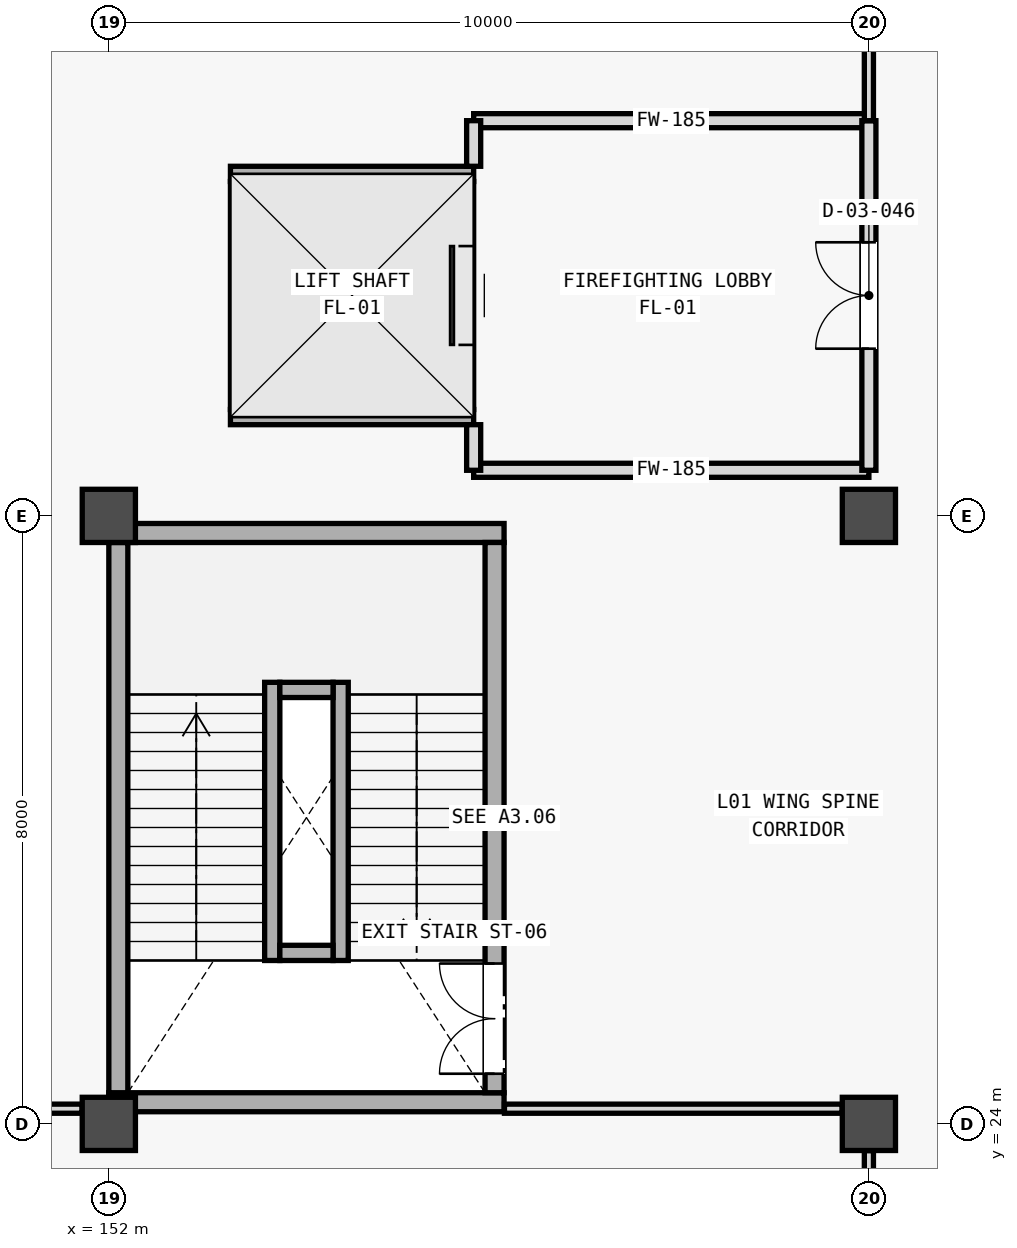
"""IFC4 building model, lengths in metres.
Left out: names, types, materials, properties, quantities, classifications, styles, units other than length and angle.
Written with IfcOpenShell. Run it as: python <this file> out.ifc"""

import sys

from ifc_helpers import new_model, si_unit, direction, frame, frame_2d, origin, origin_2d, place, context, subcontext, project, spatial, rectangle, extrude, element, fill, save


model = new_model("IFC4")
c1 = context("Model", 3, precision=1e-05, world=origin(), true_north=direction((0.0, 1.0)))
c2 = subcontext(c1, "Body", "Model", "MODEL_VIEW")
j1 = project(units=[si_unit("LENGTHUNIT", "METRE"), si_unit("PLANEANGLEUNIT", "RADIAN")], contexts=[c1])
p1 = place(None, origin())
s1 = spatial("IfcSite", under=j1, at=p1, CompositionType="ELEMENT")
p2 = place(p1, origin())
s2 = spatial("IfcBuilding", under=s1, at=p2, CompositionType="ELEMENT")
p3 = place(p2, frame((0.0, 0.0, 5.4)))
s3 = spatial("IfcBuildingStorey", under=s2, at=p3, CompositionType="ELEMENT", Elevation=5.4)
for number, where, z_axis, x_axis in (
    (1, (152.0, 24.0, 0.0), (0.0, 0.0, 1.0), (1.0, 0.0, 0.0)),
    (2, (162.0, 24.0, 0.0), (0.0, 0.0, 1.0), (1.0, 0.0, 0.0)),
    (3, (152.0, 32.0, 0.0), (0.0, 0.0, 1.0), (1.0, 0.0, 0.0)),
    (4, (162.0, 32.0, 0.0), (0.0, 0.0, 1.0), (1.0, 0.0, 0.0)),
):
    element("IfcColumn", number, at=place(p3, frame(where, z_axis=z_axis, x_axis=x_axis)), inside=s3, PredefinedType="COLUMN", context=c2, shape_type="SweptSolid", body=[
        extrude(rectangle(XDim=0.7, YDim=0.7, at=origin_2d()), origin(), (0.0, 0.0, 1.0), 4.55),
    ])
for number, where, z_axis, x_axis in (
    (5, (152.0, 24.285, 0.0), (0.0, 0.0, 1.0), (1.0, 0.0, 0.0)),
    (6, (152.0, 31.775, 0.0), (0.0, 0.0, 1.0), (1.0, 0.0, 0.0)),
):
    element("IfcWall", number, at=place(p3, frame(where, z_axis=z_axis, x_axis=x_axis)), inside=s3, PredefinedType="SHEAR", context=c2, shape_type="SweptSolid", body=[
        extrude(rectangle(XDim=5.2, YDim=0.25, at=frame_2d((2.6, 0.0))), origin(), (0.0, 0.0, 1.0), 4.8),
    ])
p4 = place(p3, frame((152.125, 24.41, 0.0), z_axis=(0.0, 0.0, 1.0), x_axis=(0.0, 1.0, 0.0)))
e7 = element("IfcWall", 7, at=p4, inside=s3, PredefinedType="SHEAR", context=c2, shape_type="SweptSolid", body=[
    extrude(rectangle(XDim=7.24, YDim=0.25, at=frame_2d((3.62, 0.0))), origin(), (0.0, 0.0, 1.0), 4.8),
])
p5 = place(p3, frame((157.075, 24.41, 0.0), z_axis=(0.0, 0.0, 1.0), x_axis=(0.0, 1.0, 0.0)))
e8 = element("IfcWall", 8, at=p5, inside=s3, PredefinedType="SHEAR", context=c2, shape_type="SweptSolid", body=[
    extrude(rectangle(XDim=7.24, YDim=0.25, at=frame_2d((3.62, 0.0))), origin(), (0.0, 0.0, 1.0), 4.8),
])
p6 = place(p5, frame((0.25, 0.0, 0.0)))
e9 = element("IfcOpeningElement", 9, at=p6, cuts=e8, PredefinedType="OPENING", context=c2, shape_type="SweptSolid", body=[
    extrude(rectangle(XDim=1.45, YDim=2.2, at=frame_2d((0.725, 1.1))), frame((0.0, 0.135, 0.0), z_axis=(0.0, -1.0, 0.0), x_axis=(1.0, 0.0, 0.0)), (0.0, 0.0, 1.0), 0.27),
])
for number, where, z_axis, x_axis in (
    (10, (154.15, 26.15, 0.0), (0.0, 0.0, 1.0), (0.0, 1.0, 0.0)),
    (11, (155.05, 26.15, 0.0), (0.0, 0.0, 1.0), (0.0, 1.0, 0.0)),
):
    element("IfcWall", number, at=place(p3, frame(where, z_axis=z_axis, x_axis=x_axis)), inside=s3, PredefinedType="SHEAR", context=c2, shape_type="SweptSolid", body=[
        extrude(rectangle(XDim=3.66, YDim=0.2, at=frame_2d((1.83, 0.0))), origin(), (0.0, 0.0, 1.0), 4.8),
    ])
for number, where, z_axis, x_axis in (
    (12, (154.25, 26.25, 0.0), (0.0, 0.0, 1.0), (1.0, 0.0, 0.0)),
    (13, (154.25, 29.71, 0.0), (0.0, 0.0, 1.0), (1.0, 0.0, 0.0)),
):
    element("IfcWall", number, at=place(p3, frame(where, z_axis=z_axis, x_axis=x_axis)), inside=s3, PredefinedType="SHEAR", context=c2, shape_type="SweptSolid", body=[
        extrude(rectangle(XDim=0.7, YDim=0.2, at=frame_2d((0.35, 0.0))), origin(), (0.0, 0.0, 1.0), 4.8),
    ])
for number, where, z_axis, x_axis in (
    (14, (153.6, 33.3, 0.0), (0.0, 0.0, 1.0), (1.0, 0.0, 0.0)),
    (15, (153.6, 36.5, 0.0), (0.0, 0.0, 1.0), (1.0, 0.0, 0.0)),
):
    element("IfcWall", number, at=place(p3, frame(where, z_axis=z_axis, x_axis=x_axis)), inside=s3, PredefinedType="SHEAR", context=c2, shape_type="SweptSolid", body=[
        extrude(rectangle(XDim=3.2, YDim=0.2, at=frame_2d((1.6, 0.0))), origin(), (0.0, 0.0, 1.0), 4.8),
    ])
p7 = place(p3, frame((153.7, 33.4, 0.0), z_axis=(0.0, 0.0, 1.0), x_axis=(0.0, 1.0, 0.0)))
e16 = element("IfcWall", 16, at=p7, inside=s3, PredefinedType="SHEAR", context=c2, shape_type="SweptSolid", body=[
    extrude(rectangle(XDim=3.0, YDim=0.2, at=frame_2d((1.5, 0.0))), origin(), (0.0, 0.0, 1.0), 4.8),
])
p8 = place(p3, frame((156.7, 33.4, 0.0), z_axis=(0.0, 0.0, 1.0), x_axis=(0.0, 1.0, 0.0)))
e17 = element("IfcWall", 17, at=p8, inside=s3, PredefinedType="SHEAR", context=c2, shape_type="SweptSolid", body=[
    extrude(rectangle(XDim=3.0, YDim=0.2, at=frame_2d((1.5, 0.0))), origin(), (0.0, 0.0, 1.0), 4.8),
])
p9 = place(p8, frame((0.85, 0.0, 0.0)))
e18 = element("IfcOpeningElement", 18, at=p9, cuts=e17, PredefinedType="OPENING", context=c2, shape_type="SweptSolid", body=[
    extrude(rectangle(XDim=1.3, YDim=2.3, at=frame_2d((0.65, 1.15))), frame((0.0, 0.11, 0.0), z_axis=(0.0, -1.0, 0.0), x_axis=(1.0, 0.0, 0.0)), (0.0, 0.0, 1.0), 0.22),
])
for number, where, z_axis, x_axis in (
    (19, (162.0, 32.6, 0.0), (0.0, 0.0, 1.0), (-1.0, 0.0, 0.0)),
    (20, (156.8, 37.2, 0.0), (0.0, 0.0, 1.0), (1.0, 0.0, 0.0)),
):
    element("IfcWall", number, at=place(p3, frame(where, z_axis=z_axis, x_axis=x_axis)), inside=s3, PredefinedType="STANDARD", context=c2, shape_type="SweptSolid", body=[
        extrude(rectangle(XDim=5.2, YDim=0.185, at=frame_2d((2.6, 0.0))), origin(), (0.0, 0.0, 1.0), 3.83),
    ])
p10 = place(p3, frame((162.0, 32.6, 0.0), z_axis=(0.0, 0.0, 1.0), x_axis=(0.0, 1.0, 0.0)))
e21 = element("IfcWall", 21, at=p10, inside=s3, PredefinedType="STANDARD", context=c2, shape_type="SweptSolid", body=[
    extrude(rectangle(XDim=4.6, YDim=0.185, at=frame_2d((2.3, 0.0))), origin(), (0.0, 0.0, 1.0), 3.83),
])
p11 = place(p10, frame((1.6, 0.0, 0.0)))
e22 = element("IfcOpeningElement", 22, at=p11, cuts=e21, PredefinedType="OPENING", context=c2, shape_type="SweptSolid", body=[
    extrude(rectangle(XDim=1.4, YDim=2.2, at=frame_2d((0.7, 1.1))), frame((0.0, 0.103, 0.0), z_axis=(0.0, -1.0, 0.0), x_axis=(1.0, 0.0, 0.0)), (0.0, 0.0, 1.0), 0.205),
])
for number, where, z_axis, x_axis in (
    (23, (156.8, 32.6, 0.0), (0.0, 0.0, 1.0), (0.0, 1.0, 0.0)),
    (24, (156.8, 36.6, 0.0), (0.0, 0.0, 1.0), (0.0, 1.0, 0.0)),
):
    element("IfcWall", number, at=place(p3, frame(where, z_axis=z_axis, x_axis=x_axis)), inside=s3, PredefinedType="STANDARD", context=c2, shape_type="SweptSolid", body=[
        extrude(rectangle(XDim=0.6, YDim=0.185, at=frame_2d((0.3, 0.0))), origin(), (0.0, 0.0, 1.0), 3.83),
    ])
p12 = place(p3, frame((162.0, 16.277, 0.0), z_axis=(0.0, 0.0, 1.0), x_axis=(0.0, 1.0, 0.0)))
e25 = element("IfcWall", 25, at=p12, inside=s3, PredefinedType="PARTITIONING", context=c2, shape_type="SweptSolid", body=[
    extrude(rectangle(XDim=7.371, YDim=0.12, at=frame_2d((3.686, 0.0))), origin(), (0.0, 0.0, 1.0), 3.83),
])
p13 = place(p12, frame((2.723, 0.0, 0.0)))
e26 = element("IfcOpeningElement", 26, at=p13, cuts=e25, PredefinedType="OPENING", context=c2, shape_type="SweptSolid", body=[
    extrude(rectangle(XDim=2.0, YDim=2.4, at=frame_2d((1.0, 1.2))), frame((0.0, 0.07, 0.0), z_axis=(0.0, -1.0, 0.0), x_axis=(1.0, 0.0, 0.0)), (0.0, 0.0, 1.0), 0.14),
])
p14 = place(p3, frame((162.0, 37.2, 0.0), z_axis=(0.0, 0.0, 1.0), x_axis=(0.0, 1.0, 0.0)))
e27 = element("IfcWall", 27, at=p14, inside=s3, PredefinedType="PARTITIONING", context=c2, shape_type="SweptSolid", body=[
    extrude(rectangle(XDim=2.448, YDim=0.12, at=frame_2d((1.224, 0.0))), origin(), (0.0, 0.0, 1.0), 3.83),
])
p15 = place(p3, frame((144.15, 24.2, 0.0), z_axis=(0.0, 0.0, 1.0), x_axis=(1.0, 0.0, 0.0)))
e28 = element("IfcWall", 28, at=p15, inside=s3, PredefinedType="PARTITIONING", context=c2, shape_type="SweptSolid", body=[
    extrude(rectangle(XDim=7.498, YDim=0.12, at=frame_2d((3.749, 0.0))), origin(), (0.0, 0.0, 1.0), 3.78),
])
p16 = place(p3, frame((157.205, 24.2, 0.0), z_axis=(0.0, 0.0, 1.0), x_axis=(1.0, 0.0, 0.0)))
e29 = element("IfcWall", 29, at=p16, inside=s3, PredefinedType="PARTITIONING", context=c2, shape_type="SweptSolid", body=[
    extrude(rectangle(XDim=4.443, YDim=0.12, at=frame_2d((2.221, 0.0))), origin(), (0.0, 0.0, 1.0), 3.68),
])
p17 = place(p6, origin())
e30 = element("IfcDoor", 30, at=p17, inside=s3, OperationType="DOUBLE_DOOR_SINGLE_SWING", PredefinedType="DOOR", context=c2, shape_type="SweptSolid", body=[
    extrude(rectangle(XDim=1.45, YDim=2.2, at=frame_2d((0.725, 1.1))), frame((0.0, 0.025, 0.0), z_axis=(0.0, -1.0, 0.0), x_axis=(1.0, 0.0, 0.0)), (0.0, 0.0, 1.0), 0.05),
])
fill(e9, e30)
p18 = place(p9, origin())
e31 = element("IfcDoor", 31, at=p18, inside=s3, OperationType="SLIDING_TO_RIGHT", PredefinedType="DOOR", context=c2, shape_type="SweptSolid", body=[
    extrude(rectangle(XDim=1.3, YDim=2.3, at=frame_2d((0.65, 1.15))), frame((0.0, 0.025, 0.0), z_axis=(0.0, -1.0, 0.0), x_axis=(1.0, 0.0, 0.0)), (0.0, 0.0, 1.0), 0.05),
])
fill(e18, e31)
p19 = place(p11, origin())
e32 = element("IfcDoor", 32, at=p19, inside=s3, OperationType="DOUBLE_DOOR_SINGLE_SWING", PredefinedType="DOOR", context=c2, shape_type="SweptSolid", body=[
    extrude(rectangle(XDim=1.4, YDim=2.2, at=frame_2d((0.7, 1.1))), frame((0.0, 0.025, 0.0), z_axis=(0.0, -1.0, 0.0), x_axis=(1.0, 0.0, 0.0)), (0.0, 0.0, 1.0), 0.05),
])
fill(e22, e32)
save(model, sys.argv[1])
